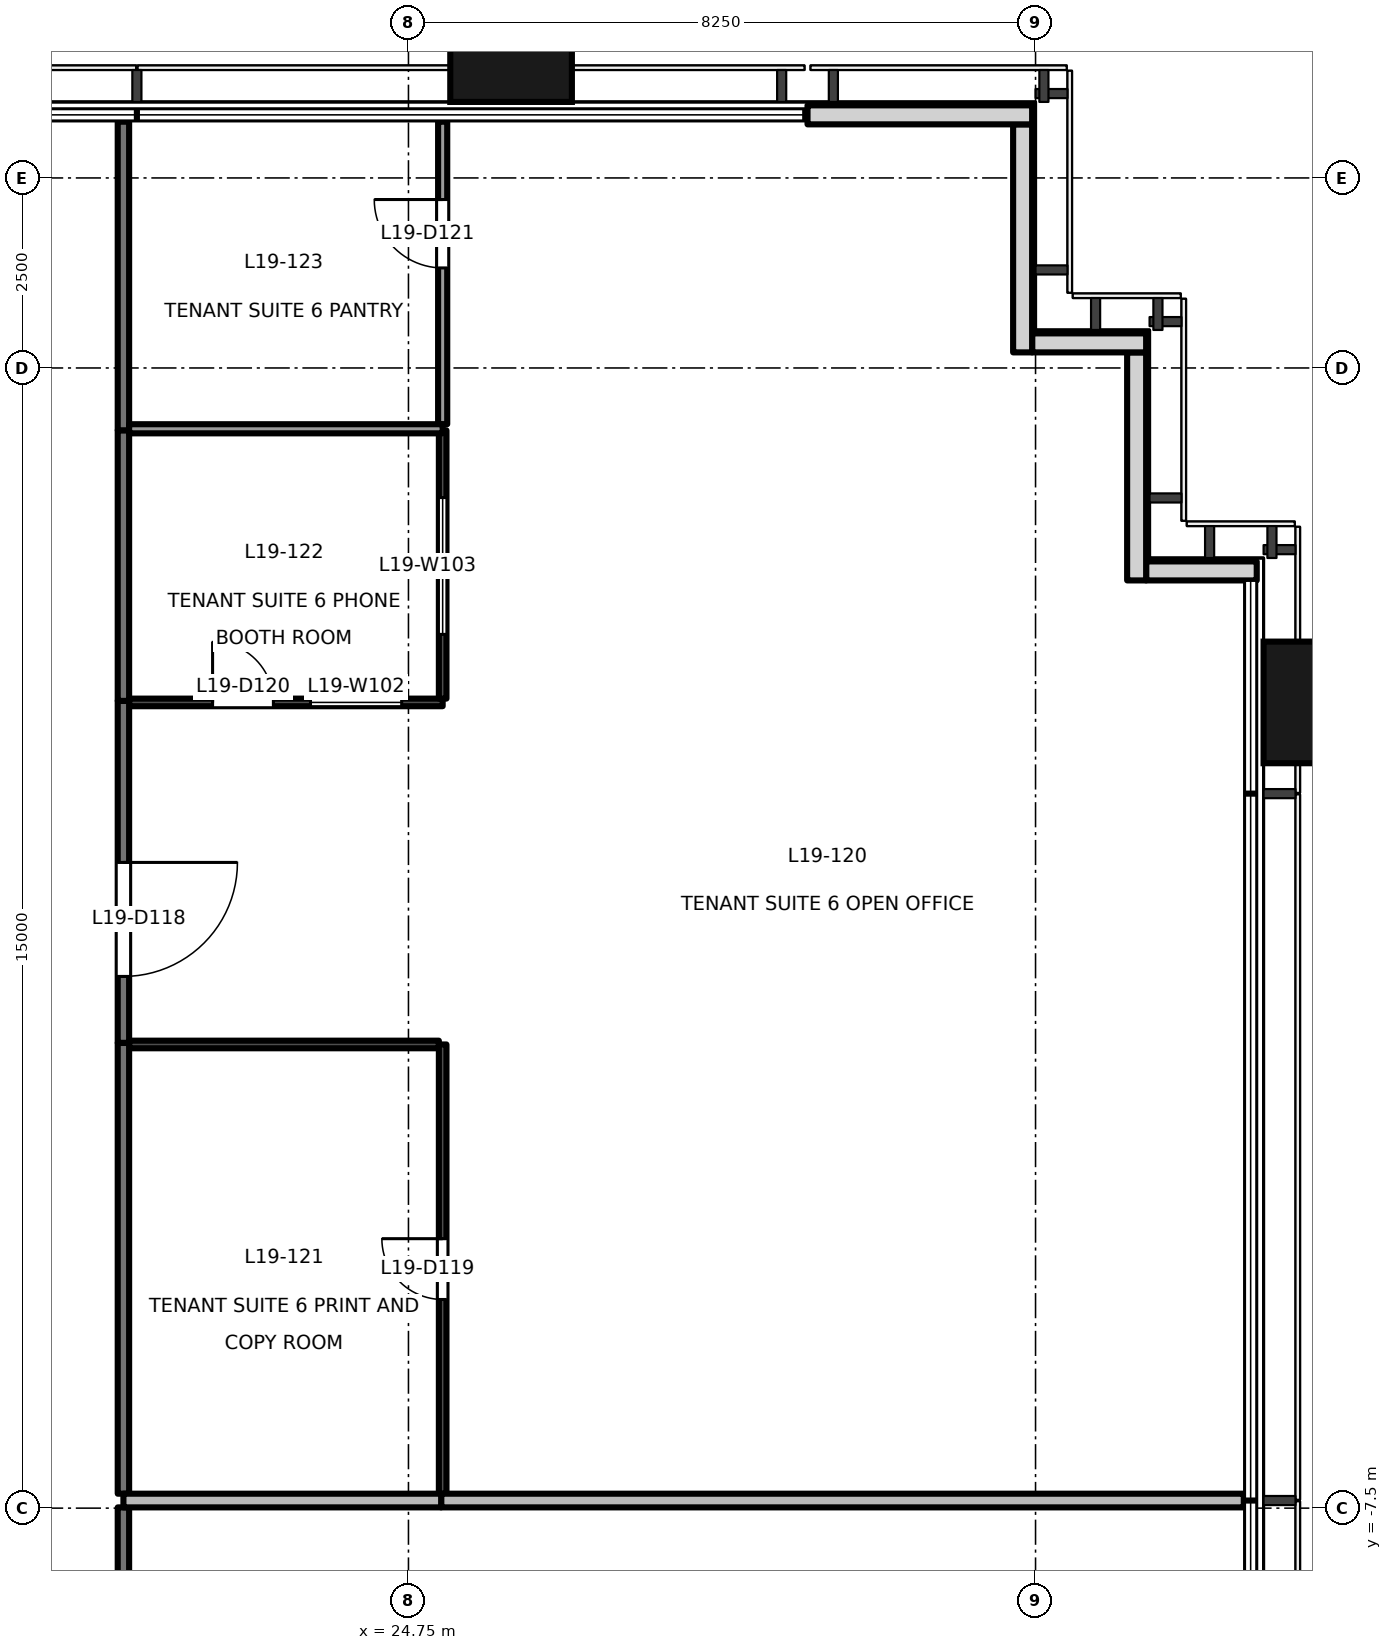
"""IFC4 building model, lengths in metres.
Left out: names, types, materials, properties, quantities, classifications, styles, units other than length and angle.
Written with IfcOpenShell. Run it as: python <this file> out.ifc"""

import sys

from ifc_helpers import new_model, si_unit, direction, frame, frame_2d, origin, origin_2d, place, context, subcontext, project, spatial, rectangle, extrude, element, fill, save


model = new_model("IFC4")
c1 = context("Model", 3, precision=1e-05, world=origin(), true_north=direction((0.0, 1.0)))
c2 = subcontext(c1, "Body", "Model", "MODEL_VIEW")
j1 = project(units=[si_unit("LENGTHUNIT", "METRE"), si_unit("PLANEANGLEUNIT", "RADIAN")], contexts=[c1])
p1 = place(None, origin())
s1 = spatial("IfcSite", under=j1, at=p1, CompositionType="ELEMENT")
p2 = place(p1, origin())
s2 = spatial("IfcBuilding", under=s1, at=p2, CompositionType="ELEMENT")
p3 = place(p2, frame((0.0, 0.0, 87.7)))
s3 = spatial("IfcBuildingStorey", under=s2, at=p3, CompositionType="ELEMENT", Elevation=87.7)
for number, where, z_axis, x_axis in (
    (1, (36.9, 3.1, -0.2), (0.0, 0.0, 1.0), (0.0, 1.0, 0.0)),
    (2, (26.1, 11.9, -0.2), (0.0, 0.0, 1.0), (1.0, 0.0, 0.0)),
):
    element("IfcColumn", number, at=place(p3, frame(where, z_axis=z_axis, x_axis=x_axis)), inside=s3, PredefinedType="COLUMN", context=c2, shape_type="SweptSolid", body=[
        extrude(rectangle(XDim=1.6, YDim=1.8, at=origin_2d()), origin(), (0.0, 0.0, 1.0), 4.0),
    ])
p4 = place(p3, frame((35.91, 4.83, 0.0), z_axis=(0.0, 0.0, 1.0), x_axis=(-1.0, 0.0, 0.0)))
e3 = element("IfcWall", 3, at=p4, inside=s3, PredefinedType="SOLIDWALL", context=c2, shape_type="SweptSolid", body=[
    extrude(rectangle(XDim=1.455, YDim=0.25, at=frame_2d((0.728, 0.0))), origin(), (0.0, 0.0, 1.0), 3.8),
])
p5 = place(p3, frame((34.33, 4.705, 0.0), z_axis=(0.0, 0.0, 1.0), x_axis=(0.0, 1.0, 0.0)))
e4 = element("IfcWall", 4, at=p5, inside=s3, PredefinedType="SOLIDWALL", context=c2, shape_type="SweptSolid", body=[
    extrude(rectangle(XDim=3.0, YDim=0.25, at=frame_2d((1.5, 0.0))), origin(), (0.0, 0.0, 1.0), 3.8),
])
p6 = place(p3, frame((34.455, 7.83, 0.0), z_axis=(0.0, 0.0, 1.0), x_axis=(-1.0, 0.0, 0.0)))
e5 = element("IfcWall", 5, at=p6, inside=s3, PredefinedType="SOLIDWALL", context=c2, shape_type="SweptSolid", body=[
    extrude(rectangle(XDim=1.5, YDim=0.25, at=frame_2d((0.75, 0.0))), origin(), (0.0, 0.0, 1.0), 3.8),
])
p7 = place(p3, frame((32.83, 7.705, 0.0), z_axis=(0.0, 0.0, 1.0), x_axis=(0.0, 1.0, 0.0)))
e6 = element("IfcWall", 6, at=p7, inside=s3, PredefinedType="SOLIDWALL", context=c2, shape_type="SweptSolid", body=[
    extrude(rectangle(XDim=3.0, YDim=0.25, at=frame_2d((1.5, 0.0))), origin(), (0.0, 0.0, 1.0), 3.8),
])
p8 = place(p3, frame((32.955, 10.83, 0.0), z_axis=(0.0, 0.0, 1.0), x_axis=(-1.0, 0.0, 0.0)))
e7 = element("IfcWall", 7, at=p8, inside=s3, PredefinedType="SOLIDWALL", context=c2, shape_type="SweptSolid", body=[
    extrude(rectangle(XDim=2.955, YDim=0.25, at=frame_2d((1.478, 0.0))), origin(), (0.0, 0.0, 1.0), 3.8),
])
p9 = place(p3, frame((21.0, -7.49, 0.0), z_axis=(0.0, 0.0, 1.0), x_axis=(0.0, -1.0, 0.0)))
e8 = element("IfcWall", 8, at=p9, inside=s3, PredefinedType="PARTITIONING", context=c2, shape_type="SweptSolid", body=[
    extrude(rectangle(XDim=3.61, YDim=0.15, at=frame_2d((1.805, 0.0))), origin(), (0.0, 0.0, 1.0), 2.9),
])
p10 = place(p9, frame((1.458, 0.0, 0.0)))
e9 = element("IfcOpeningElement", 9, at=p10, cuts=e8, PredefinedType="OPENING", context=c2, shape_type="SweptSolid", body=[
    extrude(rectangle(XDim=1.5, YDim=2.1, at=frame_2d((0.75, 1.05))), frame((0.0, 0.085, 0.0), z_axis=(0.0, -1.0, 0.0), x_axis=(1.0, 0.0, 0.0)), (0.0, 0.0, 1.0), 0.171),
])
p11 = place(p3, frame((21.0, 3.12, 0.0), z_axis=(0.0, 0.0, 1.0), x_axis=(0.0, -1.0, 0.0)))
e10 = element("IfcWall", 10, at=p11, inside=s3, PredefinedType="PARTITIONING", context=c2, shape_type="SweptSolid", body=[
    extrude(rectangle(XDim=4.5, YDim=0.15, at=frame_2d((2.25, 0.0))), origin(), (0.0, 0.0, 1.0), 2.9),
])
p12 = place(p11, frame((2.125, 0.0, 0.0)))
e11 = element("IfcOpeningElement", 11, at=p12, cuts=e10, PredefinedType="OPENING", context=c2, shape_type="SweptSolid", body=[
    extrude(rectangle(XDim=1.5, YDim=2.1, at=frame_2d((0.75, 1.05))), frame((0.0, 0.085, 0.0), z_axis=(0.0, -1.0, 0.0), x_axis=(1.0, 0.0, 0.0)), (0.0, 0.0, 1.0), 0.171),
])
p13 = place(p3, frame((21.0, -1.38, 0.0), z_axis=(0.0, 0.0, 1.0), x_axis=(0.0, -1.0, 0.0)))
e12 = element("IfcWall", 12, at=p13, inside=s3, PredefinedType="PARTITIONING", context=c2, shape_type="SweptSolid", body=[
    extrude(rectangle(XDim=5.93, YDim=0.15, at=frame_2d((2.965, 0.0))), origin(), (0.0, 0.0, 1.0), 2.9),
])
p14 = place(p3, frame((21.0, 6.68, 0.0), z_axis=(0.0, 0.0, 1.0), x_axis=(0.0, -1.0, 0.0)))
e13 = element("IfcWall", 13, at=p14, inside=s3, PredefinedType="PARTITIONING", context=c2, shape_type="SweptSolid", body=[
    extrude(rectangle(XDim=3.56, YDim=0.15, at=frame_2d((1.78, 0.0))), origin(), (0.0, 0.0, 1.0), 2.9),
])
p15 = place(p3, frame((21.0, 10.74, 0.0), z_axis=(0.0, 0.0, 1.0), x_axis=(0.0, -1.0, 0.0)))
e14 = element("IfcWall", 14, at=p15, inside=s3, PredefinedType="PARTITIONING", context=c2, shape_type="SweptSolid", body=[
    extrude(rectangle(XDim=4.06, YDim=0.15, at=frame_2d((2.03, 0.0))), origin(), (0.0, 0.0, 1.0), 3.8),
])
p16 = place(p3, frame((25.18, -7.4, 0.0), z_axis=(0.0, 0.0, 1.0), x_axis=(1.0, 0.0, 0.0)))
e15 = element("IfcWall", 15, at=p16, inside=s3, PredefinedType="PARTITIONING", context=c2, shape_type="SweptSolid", body=[
    extrude(rectangle(XDim=10.56, YDim=0.18, at=frame_2d((5.28, 0.0))), origin(), (0.0, 0.0, 1.0), 3.8),
])
p17 = place(p3, frame((21.0, -7.4, 0.0), z_axis=(0.0, 0.0, 1.0), x_axis=(1.0, 0.0, 0.0)))
e16 = element("IfcWall", 16, at=p17, inside=s3, PredefinedType="PARTITIONING", context=c2, shape_type="SweptSolid", body=[
    extrude(rectangle(XDim=4.18, YDim=0.18, at=frame_2d((2.09, 0.0))), origin(), (0.0, 0.0, 1.0), 3.8),
])
p18 = place(p3, frame((25.15, -1.4, 0.0), z_axis=(0.0, 0.0, 1.0), x_axis=(-1.0, 0.0, 0.0)))
e17 = element("IfcWall", 17, at=p18, inside=s3, PredefinedType="PARTITIONING", context=c2, shape_type="SweptSolid", body=[
    extrude(rectangle(XDim=4.075, YDim=0.1, at=frame_2d((2.038, 0.0))), origin(), (0.0, 0.0, 1.0), 3.8),
])
p19 = place(p3, frame((25.2, -7.31, 0.0), z_axis=(0.0, 0.0, 1.0), x_axis=(0.0, 1.0, 0.0)))
e18 = element("IfcWall", 18, at=p19, inside=s3, PredefinedType="PARTITIONING", context=c2, shape_type="SweptSolid", body=[
    extrude(rectangle(XDim=5.91, YDim=0.1, at=frame_2d((2.955, 0.0))), origin(), (0.0, 0.0, 1.0), 2.9),
])
p20 = place(p19, frame((2.555, 0.0, 0.0)))
e19 = element("IfcOpeningElement", 19, at=p20, cuts=e18, PredefinedType="OPENING", context=c2, shape_type="SweptSolid", body=[
    extrude(rectangle(XDim=0.8, YDim=2.1, at=frame_2d((0.4, 1.05))), frame((0.0, 0.061, 0.0), z_axis=(0.0, -1.0, 0.0), x_axis=(1.0, 0.0, 0.0)), (0.0, 0.0, 1.0), 0.121),
])
p21 = place(p3, frame((21.075, 3.1, 0.0), z_axis=(0.0, 0.0, 1.0), x_axis=(1.0, 0.0, 0.0)))
e20 = element("IfcWall", 20, at=p21, inside=s3, PredefinedType="PARTITIONING", context=c2, shape_type="SweptSolid", body=[
    extrude(rectangle(XDim=4.125, YDim=0.1, at=frame_2d((2.062, 0.0))), origin(), (0.0, 0.0, 1.0), 3.8),
])
p22 = place(p21, frame((1.098, 0.0, 0.0)))
e21 = element("IfcOpeningElement", 21, at=p22, cuts=e20, PredefinedType="OPENING", context=c2, shape_type="SweptSolid", body=[
    extrude(rectangle(XDim=0.8, YDim=2.1, at=frame_2d((0.4, 1.05))), frame((0.0, 0.061, 0.0), z_axis=(0.0, -1.0, 0.0), x_axis=(1.0, 0.0, 0.0)), (0.0, 0.0, 1.0), 0.121),
])
p23 = place(p21, frame((2.386, 0.0, 0.9)))
e22 = element("IfcOpeningElement", 22, at=p23, cuts=e20, PredefinedType="OPENING", context=c2, shape_type="SweptSolid", body=[
    extrude(rectangle(XDim=1.2, YDim=1.2, at=frame_2d((0.6, 0.6))), frame((0.0, 0.061, 0.0), z_axis=(0.0, -1.0, 0.0), x_axis=(1.0, 0.0, 0.0)), (0.0, 0.0, 1.0), 0.121),
])
p24 = place(p3, frame((25.2, 3.15, 0.0), z_axis=(0.0, 0.0, 1.0), x_axis=(0.0, 1.0, 0.0)))
e23 = element("IfcWall", 23, at=p24, inside=s3, PredefinedType="PARTITIONING", context=c2, shape_type="SweptSolid", body=[
    extrude(rectangle(XDim=3.53, YDim=0.1, at=frame_2d((1.765, 0.0))), origin(), (0.0, 0.0, 1.0), 2.9),
])
p25 = place(p24, frame((0.845, 0.0, 0.9)))
e24 = element("IfcOpeningElement", 24, at=p25, cuts=e23, PredefinedType="OPENING", context=c2, shape_type="SweptSolid", body=[
    extrude(rectangle(XDim=1.8, YDim=1.2, at=frame_2d((0.9, 0.6))), frame((0.0, 0.061, 0.0), z_axis=(0.0, -1.0, 0.0), x_axis=(1.0, 0.0, 0.0)), (0.0, 0.0, 1.0), 0.121),
])
p26 = place(p3, frame((25.2, 6.76, 0.0), z_axis=(0.0, 0.0, 1.0), x_axis=(0.0, 1.0, 0.0)))
e25 = element("IfcWall", 25, at=p26, inside=s3, PredefinedType="PARTITIONING", context=c2, shape_type="SweptSolid", body=[
    extrude(rectangle(XDim=3.98, YDim=0.12, at=frame_2d((1.99, 0.0))), origin(), (0.0, 0.0, 1.0), 3.8),
])
p27 = place(p26, frame((2.056, 0.0, 0.0)))
e26 = element("IfcOpeningElement", 26, at=p27, cuts=e25, PredefinedType="OPENING", context=c2, shape_type="SweptSolid", body=[
    extrude(rectangle(XDim=0.9, YDim=2.1, at=frame_2d((0.45, 1.05))), frame((0.0, 0.071, 0.0), z_axis=(0.0, -1.0, 0.0), x_axis=(1.0, 0.0, 0.0)), (0.0, 0.0, 1.0), 0.141),
])
p28 = place(p3, frame((21.075, 6.7, 0.0), z_axis=(0.0, 0.0, 1.0), x_axis=(1.0, 0.0, 0.0)))
e27 = element("IfcWall", 27, at=p28, inside=s3, PredefinedType="PARTITIONING", context=c2, shape_type="SweptSolid", body=[
    extrude(rectangle(XDim=4.125, YDim=0.12, at=frame_2d((2.062, 0.0))), origin(), (0.0, 0.0, 1.0), 3.8),
])
p29 = place(p12, origin())
e28 = element("IfcDoor", 28, at=p29, inside=s3, OperationType="DOUBLE_DOOR_SINGLE_SWING", PredefinedType="DOOR", context=c2, shape_type="SweptSolid", body=[
    extrude(rectangle(XDim=1.5, YDim=2.1, at=frame_2d((0.75, 1.05))), frame((0.0, 0.025, 0.0), z_axis=(0.0, -1.0, 0.0), x_axis=(1.0, 0.0, 0.0)), (0.0, 0.0, 1.0), 0.05),
])
fill(e11, e28)
p30 = place(p20, origin())
e29 = element("IfcDoor", 29, at=p30, inside=s3, OperationType="SINGLE_SWING_RIGHT", PredefinedType="DOOR", context=c2, shape_type="SweptSolid", body=[
    extrude(rectangle(XDim=0.8, YDim=2.1, at=frame_2d((0.4, 1.05))), frame((0.0, 0.025, 0.0), z_axis=(0.0, -1.0, 0.0), x_axis=(1.0, 0.0, 0.0)), (0.0, 0.0, 1.0), 0.05),
])
fill(e19, e29)
p31 = place(p22, origin())
e30 = element("IfcDoor", 30, at=p31, inside=s3, OperationType="SINGLE_SWING_LEFT", PredefinedType="DOOR", context=c2, shape_type="SweptSolid", body=[
    extrude(rectangle(XDim=0.8, YDim=2.1, at=frame_2d((0.4, 1.05))), frame((0.0, 0.025, 0.0), z_axis=(0.0, -1.0, 0.0), x_axis=(1.0, 0.0, 0.0)), (0.0, 0.0, 1.0), 0.05),
])
fill(e21, e30)
p32 = place(p27, origin())
e31 = element("IfcDoor", 31, at=p32, inside=s3, OperationType="SINGLE_SWING_RIGHT", PredefinedType="DOOR", context=c2, shape_type="SweptSolid", body=[
    extrude(rectangle(XDim=0.9, YDim=2.1, at=frame_2d((0.45, 1.05))), frame((0.0, 0.025, 0.0), z_axis=(0.0, -1.0, 0.0), x_axis=(1.0, 0.0, 0.0)), (0.0, 0.0, 1.0), 0.05),
])
fill(e26, e31)
p33 = place(p23, origin())
e32 = element("IfcWindow", 32, at=p33, inside=s3, PartitioningType="SINGLE_PANEL", PredefinedType="WINDOW", context=c2, shape_type="SweptSolid", body=[
    extrude(rectangle(XDim=1.2, YDim=1.2, at=frame_2d((0.6, 0.6))), frame((0.0, 0.03, 0.0), z_axis=(0.0, -1.0, 0.0), x_axis=(1.0, 0.0, 0.0)), (0.0, 0.0, 1.0), 0.06),
])
fill(e22, e32)
p34 = place(p25, origin())
e33 = element("IfcWindow", 33, at=p34, inside=s3, PartitioningType="SINGLE_PANEL", PredefinedType="WINDOW", context=c2, shape_type="SweptSolid", body=[
    extrude(rectangle(XDim=1.8, YDim=1.2, at=frame_2d((0.9, 0.6))), frame((0.0, 0.03, 0.0), z_axis=(0.0, -1.0, 0.0), x_axis=(1.0, 0.0, 0.0)), (0.0, 0.0, 1.0), 0.06),
])
fill(e24, e33)
save(model, sys.argv[1])
